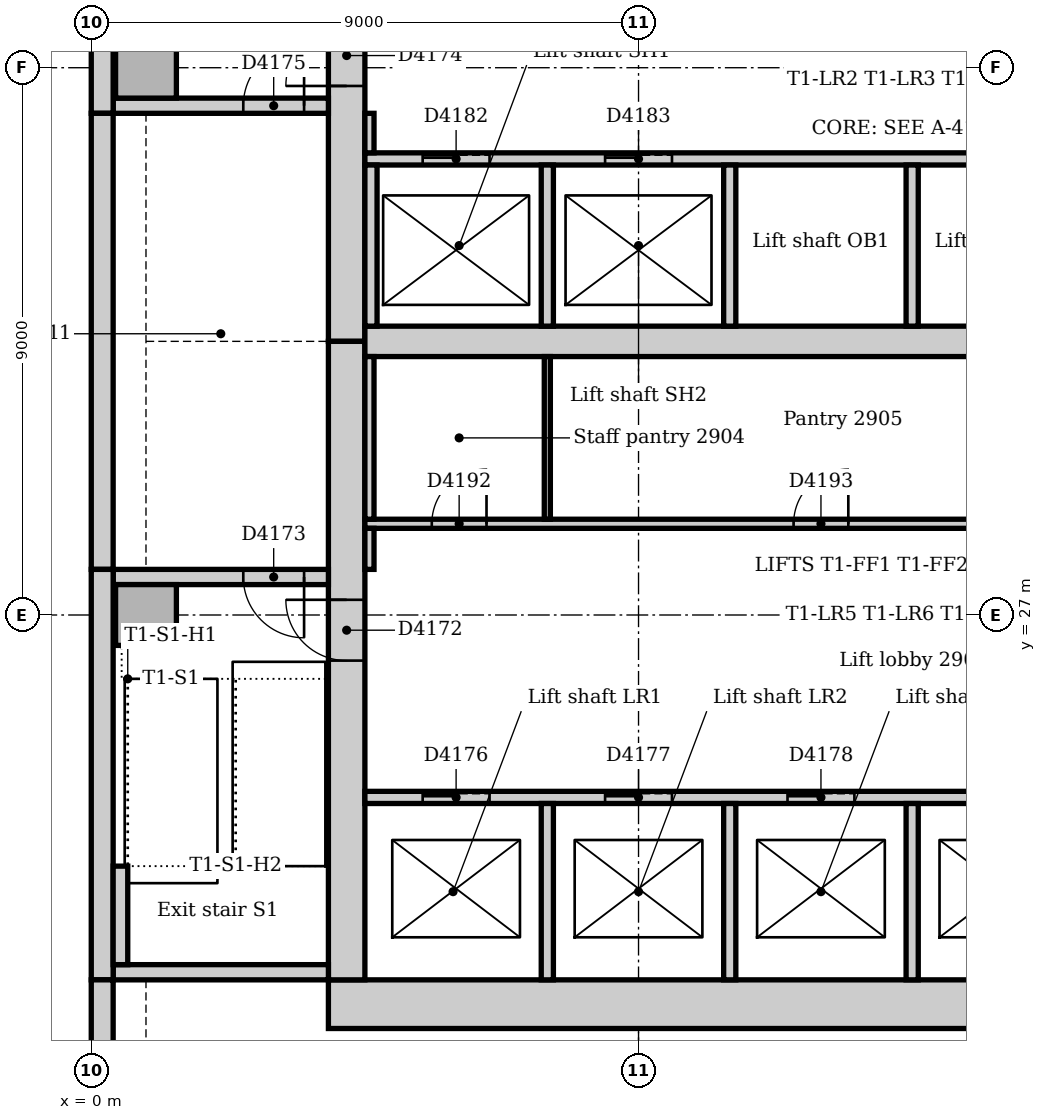
"""IFC4 building model, lengths in metres.
Left out: names, types, materials, properties, quantities, classifications, styles, units other than length and angle.
Written with IfcOpenShell. Run it as: python <this file> out.ifc"""

import sys

from ifc_helpers import new_model, si_unit, direction, frame, frame_2d, origin, origin_2d, place, context, subcontext, project, spatial, rectangle, extrude, element, fill, save


model = new_model("IFC4")
c1 = context("Model", 3, precision=1e-05, world=origin(), true_north=direction((0.0, 1.0)))
c2 = subcontext(c1, "Body", "Model", "MODEL_VIEW")
j1 = project(units=[si_unit("LENGTHUNIT", "METRE"), si_unit("PLANEANGLEUNIT", "RADIAN")], contexts=[c1])
p1 = place(None, origin())
s1 = spatial("IfcSite", under=j1, at=p1, CompositionType="ELEMENT")
p2 = place(p1, origin())
s2 = spatial("IfcBuilding", under=s1, at=p2, CompositionType="ELEMENT")
p3 = place(p2, frame((0.0, 0.0, 124.0)))
s3 = spatial("IfcBuildingStorey", under=s2, at=p3, CompositionType="ELEMENT", Elevation=124.0)
p4 = place(p3, frame((3.9, 20.6, 0.0), z_axis=(0.0, 0.0, 1.0), x_axis=(1.0, 0.0, 0.0)))
e1 = element("IfcWall", 1, at=p4, inside=s3, PredefinedType="SOLIDWALL", context=c2, shape_type="SweptSolid", body=[
    extrude(rectangle(XDim=19.4, YDim=0.8, at=frame_2d((9.7, 0.0))), origin(), (0.0, 0.0, 1.0), 4.0),
])
p5 = place(p3, frame((4.2, 42.0, 0.0), z_axis=(0.0, 0.0, 1.0), x_axis=(0.0, -1.0, 0.0)))
e2 = element("IfcWall", 2, at=p5, inside=s3, PredefinedType="SOLIDWALL", context=c2, shape_type="SweptSolid", body=[
    extrude(rectangle(XDim=10.5, YDim=0.6, at=frame_2d((5.25, 0.0))), origin(), (0.0, 0.0, 1.0), 4.0),
])
p6 = place(p5, frame((5.3, 0.0, 0.0)))
e3 = element("IfcOpeningElement", 3, at=p6, cuts=e2, PredefinedType="OPENING", context=c2, shape_type="SweptSolid", body=[
    extrude(rectangle(XDim=1.0, YDim=2.1, at=frame_2d((0.5, 1.05))), frame((0.0, 0.31, 0.0), z_axis=(0.0, -1.0, 0.0), x_axis=(1.0, 0.0, 0.0)), (0.0, 0.0, 1.0), 0.62),
])
p7 = place(p3, frame((4.2, 31.5, 0.0), z_axis=(0.0, 0.0, 1.0), x_axis=(0.0, -1.0, 0.0)))
e4 = element("IfcWall", 4, at=p7, inside=s3, PredefinedType="SOLIDWALL", context=c2, shape_type="SweptSolid", body=[
    extrude(rectangle(XDim=10.5, YDim=0.6, at=frame_2d((5.25, 0.0))), origin(), (0.0, 0.0, 1.0), 4.0),
])
p8 = place(p7, frame((4.25, 0.0, 0.0)))
e5 = element("IfcOpeningElement", 5, at=p8, cuts=e4, PredefinedType="OPENING", context=c2, shape_type="SweptSolid", body=[
    extrude(rectangle(XDim=1.0, YDim=2.1, at=frame_2d((0.5, 1.05))), frame((0.0, 0.31, 0.0), z_axis=(0.0, -1.0, 0.0), x_axis=(1.0, 0.0, 0.0)), (0.0, 0.0, 1.0), 0.62),
])
p9 = place(p3, frame((4.5, 31.5, 0.0), z_axis=(0.0, 0.0, 1.0), x_axis=(1.0, 0.0, 0.0)))
e6 = element("IfcWall", 6, at=p9, inside=s3, PredefinedType="SOLIDWALL", context=c2, shape_type="SweptSolid", body=[
    extrude(rectangle(XDim=18.0, YDim=0.5, at=frame_2d((9.0, 0.0))), origin(), (0.0, 0.0, 1.0), 4.0),
])
p10 = place(p3, frame((0.36, 21.125, 0.0), z_axis=(0.0, 0.0, 1.0), x_axis=(1.0, 0.0, 0.0)))
e7 = element("IfcWall", 7, at=p10, inside=s3, PredefinedType="SOLIDWALL", context=c2, shape_type="SweptSolid", body=[
    extrude(rectangle(XDim=3.54, YDim=0.25, at=frame_2d((1.77, 0.0))), origin(), (0.0, 0.0, 1.0), 4.0),
])
p11 = place(p3, frame((3.9, 27.625, 0.0), z_axis=(0.0, 0.0, 1.0), x_axis=(-1.0, 0.0, 0.0)))
e8 = element("IfcWall", 8, at=p11, inside=s3, PredefinedType="SOLIDWALL", context=c2, shape_type="SweptSolid", body=[
    extrude(rectangle(XDim=3.54, YDim=0.25, at=frame_2d((1.77, 0.0))), origin(), (0.0, 0.0, 1.0), 4.0),
])
p12 = place(p11, frame((0.4, 0.0, 0.0)))
e9 = element("IfcOpeningElement", 9, at=p12, cuts=e8, PredefinedType="OPENING", context=c2, shape_type="SweptSolid", body=[
    extrude(rectangle(XDim=1.0, YDim=2.1, at=frame_2d((0.5, 1.05))), frame((0.0, 0.135, 0.0), z_axis=(0.0, -1.0, 0.0), x_axis=(1.0, 0.0, 0.0)), (0.0, 0.0, 1.0), 0.27),
])
p13 = place(p3, frame((0.36, 35.375, 0.0), z_axis=(0.0, 0.0, 1.0), x_axis=(1.0, 0.0, 0.0)))
e10 = element("IfcWall", 10, at=p13, inside=s3, PredefinedType="SOLIDWALL", context=c2, shape_type="SweptSolid", body=[
    extrude(rectangle(XDim=3.54, YDim=0.25, at=frame_2d((1.77, 0.0))), origin(), (0.0, 0.0, 1.0), 4.0),
])
p14 = place(p13, frame((2.14, 0.0, 0.0)))
e11 = element("IfcOpeningElement", 11, at=p14, cuts=e10, PredefinedType="OPENING", context=c2, shape_type="SweptSolid", body=[
    extrude(rectangle(XDim=1.0, YDim=2.1, at=frame_2d((0.5, 1.05))), frame((0.0, 0.135, 0.0), z_axis=(0.0, -1.0, 0.0), x_axis=(1.0, 0.0, 0.0)), (0.0, 0.0, 1.0), 0.27),
])
for number, where, z_axis, x_axis in (
    (12, (0.9, 27.0, 0.0), (0.0, 0.0, 1.0), (1.0, 0.0, 0.0)),
    (13, (0.9, 36.0, 0.0), (0.0, 0.0, 1.0), (1.0, 0.0, 0.0)),
):
    element("IfcColumn", number, at=place(p3, frame(where, z_axis=z_axis, x_axis=x_axis)), inside=s3, PredefinedType="COLUMN", context=c2, shape_type="SweptSolid", body=[
        extrude(rectangle(XDim=1.0, YDim=1.0, at=origin_2d()), origin(), (0.0, 0.0, 1.0), 4.0),
    ])
p15 = place(p3, frame((0.18, 42.0, 0.0), z_axis=(0.0, 0.0, 1.0), x_axis=(0.0, -1.0, 0.0)))
e14 = element("IfcWall", 14, at=p15, inside=s3, PredefinedType="STANDARD", context=c2, shape_type="SweptSolid", body=[
    extrude(rectangle(XDim=6.75, YDim=0.36, at=frame_2d((3.375, 0.0))), origin(), (0.0, 0.0, 1.0), 3.85),
])
p16 = place(p3, frame((0.18, 35.25, 0.0), z_axis=(0.0, 0.0, 1.0), x_axis=(0.0, -1.0, 0.0)))
e15 = element("IfcWall", 15, at=p16, inside=s3, PredefinedType="STANDARD", context=c2, shape_type="SweptSolid", body=[
    extrude(rectangle(XDim=7.5, YDim=0.36, at=frame_2d((3.75, 0.0))), origin(), (0.0, 0.0, 1.0), 3.85),
])
p17 = place(p3, frame((0.18, 27.75, 0.0), z_axis=(0.0, 0.0, 1.0), x_axis=(0.0, -1.0, 0.0)))
e16 = element("IfcWall", 16, at=p17, inside=s3, PredefinedType="STANDARD", context=c2, shape_type="SweptSolid", body=[
    extrude(rectangle(XDim=6.75, YDim=0.36, at=frame_2d((3.375, 0.0))), origin(), (0.0, 0.0, 1.0), 3.85),
])
p18 = place(p3, frame((0.18, 21.0, 0.0), z_axis=(0.0, 0.0, 1.0), x_axis=(0.0, -1.0, 0.0)))
e17 = element("IfcWall", 17, at=p18, inside=s3, PredefinedType="STANDARD", context=c2, shape_type="SweptSolid", body=[
    extrude(rectangle(XDim=12.257, YDim=0.36, at=frame_2d((6.129, 0.0))), origin(), (0.0, 0.0, 1.0), 3.85),
])
p19 = place(p18, frame((1.35, 0.0, 0.9)))
e18 = element("IfcOpeningElement", 18, at=p19, cuts=e17, PredefinedType="OPENING", context=c2, shape_type="SweptSolid", body=[
    extrude(rectangle(XDim=3.3, YDim=1.6, at=frame_2d((1.65, 0.8))), frame((0.0, 0.19, 0.0), z_axis=(0.0, -1.0, 0.0), x_axis=(1.0, 0.0, 0.0)), (0.0, 0.0, 1.0), 0.38),
])
p20 = place(p18, frame((5.85, 0.0, 0.9)))
e19 = element("IfcOpeningElement", 19, at=p20, cuts=e17, PredefinedType="OPENING", context=c2, shape_type="SweptSolid", body=[
    extrude(rectangle(XDim=3.3, YDim=1.6, at=frame_2d((1.65, 0.8))), frame((0.0, 0.19, 0.0), z_axis=(0.0, -1.0, 0.0), x_axis=(1.0, 0.0, 0.0)), (0.0, 0.0, 1.0), 0.38),
])
p21 = place(p3, frame((0.48, 21.25, 0.0), z_axis=(0.0, 0.0, 1.0), x_axis=(0.0, 1.0, 0.0)))
e20 = element("IfcWall", 20, at=p21, inside=s3, PredefinedType="STANDARD", context=c2, shape_type="SweptSolid", body=[
    extrude(rectangle(XDim=1.62, YDim=0.24, at=frame_2d((0.81, 0.0))), origin(), (0.0, 0.0, 1.0), 4.0),
])
p22 = place(p3, frame((4.5, 24.0, 0.0), z_axis=(0.0, 0.0, 1.0), x_axis=(1.0, 0.0, 0.0)))
e21 = element("IfcWall", 21, at=p22, inside=s3, PredefinedType="PARTITIONING", context=c2, shape_type="SweptSolid", body=[
    extrude(rectangle(XDim=18.0, YDim=0.2, at=frame_2d((9.0, 0.0))), origin(), (0.0, 0.0, 1.0), 3.85),
])
p23 = place(p22, frame((0.95, 0.0, 0.0)))
e22 = element("IfcOpeningElement", 22, at=p23, cuts=e21, PredefinedType="OPENING", context=c2, shape_type="SweptSolid", body=[
    extrude(rectangle(XDim=1.1, YDim=2.1, at=frame_2d((0.55, 1.05))), frame((0.0, 0.11, 0.0), z_axis=(0.0, -1.0, 0.0), x_axis=(1.0, 0.0, 0.0)), (0.0, 0.0, 1.0), 0.22),
])
p24 = place(p22, frame((3.95, 0.0, 0.0)))
e23 = element("IfcOpeningElement", 23, at=p24, cuts=e21, PredefinedType="OPENING", context=c2, shape_type="SweptSolid", body=[
    extrude(rectangle(XDim=1.1, YDim=2.1, at=frame_2d((0.55, 1.05))), frame((0.0, 0.11, 0.0), z_axis=(0.0, -1.0, 0.0), x_axis=(1.0, 0.0, 0.0)), (0.0, 0.0, 1.0), 0.22),
])
p25 = place(p22, frame((6.95, 0.0, 0.0)))
e24 = element("IfcOpeningElement", 24, at=p25, cuts=e21, PredefinedType="OPENING", context=c2, shape_type="SweptSolid", body=[
    extrude(rectangle(XDim=1.1, YDim=2.1, at=frame_2d((0.55, 1.05))), frame((0.0, 0.11, 0.0), z_axis=(0.0, -1.0, 0.0), x_axis=(1.0, 0.0, 0.0)), (0.0, 0.0, 1.0), 0.22),
])
p26 = place(p22, frame((9.95, 0.0, 0.0)))
e25 = element("IfcOpeningElement", 25, at=p26, cuts=e21, PredefinedType="OPENING", context=c2, shape_type="SweptSolid", body=[
    extrude(rectangle(XDim=1.1, YDim=2.1, at=frame_2d((0.55, 1.05))), frame((0.0, 0.11, 0.0), z_axis=(0.0, -1.0, 0.0), x_axis=(1.0, 0.0, 0.0)), (0.0, 0.0, 1.0), 0.22),
])
p27 = place(p22, frame((12.95, 0.0, 0.0)))
e26 = element("IfcOpeningElement", 26, at=p27, cuts=e21, PredefinedType="OPENING", context=c2, shape_type="SweptSolid", body=[
    extrude(rectangle(XDim=1.1, YDim=2.1, at=frame_2d((0.55, 1.05))), frame((0.0, 0.11, 0.0), z_axis=(0.0, -1.0, 0.0), x_axis=(1.0, 0.0, 0.0)), (0.0, 0.0, 1.0), 0.22),
])
p28 = place(p22, frame((15.95, 0.0, 0.0)))
e27 = element("IfcOpeningElement", 27, at=p28, cuts=e21, PredefinedType="OPENING", context=c2, shape_type="SweptSolid", body=[
    extrude(rectangle(XDim=1.1, YDim=2.1, at=frame_2d((0.55, 1.05))), frame((0.0, 0.11, 0.0), z_axis=(0.0, -1.0, 0.0), x_axis=(1.0, 0.0, 0.0)), (0.0, 0.0, 1.0), 0.22),
])
p29 = place(p3, frame((4.5, 34.5, 0.0), z_axis=(0.0, 0.0, 1.0), x_axis=(1.0, 0.0, 0.0)))
e28 = element("IfcWall", 28, at=p29, inside=s3, PredefinedType="PARTITIONING", context=c2, shape_type="SweptSolid", body=[
    extrude(rectangle(XDim=18.0, YDim=0.2, at=frame_2d((9.0, 0.0))), origin(), (0.0, 0.0, 1.0), 3.85),
])
p30 = place(p29, frame((0.95, 0.0, 0.0)))
e29 = element("IfcOpeningElement", 29, at=p30, cuts=e28, PredefinedType="OPENING", context=c2, shape_type="SweptSolid", body=[
    extrude(rectangle(XDim=1.1, YDim=2.1, at=frame_2d((0.55, 1.05))), frame((0.0, 0.11, 0.0), z_axis=(0.0, -1.0, 0.0), x_axis=(1.0, 0.0, 0.0)), (0.0, 0.0, 1.0), 0.22),
])
p31 = place(p29, frame((3.95, 0.0, 0.0)))
e30 = element("IfcOpeningElement", 30, at=p31, cuts=e28, PredefinedType="OPENING", context=c2, shape_type="SweptSolid", body=[
    extrude(rectangle(XDim=1.1, YDim=2.1, at=frame_2d((0.55, 1.05))), frame((0.0, 0.11, 0.0), z_axis=(0.0, -1.0, 0.0), x_axis=(1.0, 0.0, 0.0)), (0.0, 0.0, 1.0), 0.22),
])
p32 = place(p29, frame((12.95, 0.0, 0.0)))
e31 = element("IfcOpeningElement", 31, at=p32, cuts=e28, PredefinedType="OPENING", context=c2, shape_type="SweptSolid", body=[
    extrude(rectangle(XDim=1.1, YDim=2.1, at=frame_2d((0.55, 1.05))), frame((0.0, 0.11, 0.0), z_axis=(0.0, -1.0, 0.0), x_axis=(1.0, 0.0, 0.0)), (0.0, 0.0, 1.0), 0.22),
])
p33 = place(p29, frame((15.95, 0.0, 0.0)))
e32 = element("IfcOpeningElement", 32, at=p33, cuts=e28, PredefinedType="OPENING", context=c2, shape_type="SweptSolid", body=[
    extrude(rectangle(XDim=1.1, YDim=2.1, at=frame_2d((0.55, 1.05))), frame((0.0, 0.11, 0.0), z_axis=(0.0, -1.0, 0.0), x_axis=(1.0, 0.0, 0.0)), (0.0, 0.0, 1.0), 0.22),
])
p34 = place(p3, frame((4.6, 31.75, 0.0), z_axis=(0.0, 0.0, 1.0), x_axis=(0.0, 1.0, 0.0)))
e33 = element("IfcWall", 33, at=p34, inside=s3, PredefinedType="PARTITIONING", context=c2, shape_type="SweptSolid", body=[
    extrude(rectangle(XDim=2.65, YDim=0.2, at=frame_2d((1.325, 0.0))), origin(), (0.0, 0.0, 1.0), 3.85),
])
p35 = place(p3, frame((7.5, 21.0, 0.0), z_axis=(0.0, 0.0, 1.0), x_axis=(0.0, 1.0, 0.0)))
e34 = element("IfcWall", 34, at=p35, inside=s3, PredefinedType="PARTITIONING", context=c2, shape_type="SweptSolid", body=[
    extrude(rectangle(XDim=2.9, YDim=0.2, at=frame_2d((1.45, 0.0))), origin(), (0.0, 0.0, 1.0), 3.85),
])
p36 = place(p3, frame((7.5, 31.75, 0.0), z_axis=(0.0, 0.0, 1.0), x_axis=(0.0, 1.0, 0.0)))
e35 = element("IfcWall", 35, at=p36, inside=s3, PredefinedType="PARTITIONING", context=c2, shape_type="SweptSolid", body=[
    extrude(rectangle(XDim=2.65, YDim=0.2, at=frame_2d((1.325, 0.0))), origin(), (0.0, 0.0, 1.0), 3.85),
])
p37 = place(p3, frame((10.5, 21.0, 0.0), z_axis=(0.0, 0.0, 1.0), x_axis=(0.0, 1.0, 0.0)))
e36 = element("IfcWall", 36, at=p37, inside=s3, PredefinedType="PARTITIONING", context=c2, shape_type="SweptSolid", body=[
    extrude(rectangle(XDim=2.9, YDim=0.2, at=frame_2d((1.45, 0.0))), origin(), (0.0, 0.0, 1.0), 3.85),
])
p38 = place(p3, frame((10.5, 31.75, 0.0), z_axis=(0.0, 0.0, 1.0), x_axis=(0.0, 1.0, 0.0)))
e37 = element("IfcWall", 37, at=p38, inside=s3, PredefinedType="PARTITIONING", context=c2, shape_type="SweptSolid", body=[
    extrude(rectangle(XDim=2.65, YDim=0.2, at=frame_2d((1.325, 0.0))), origin(), (0.0, 0.0, 1.0), 3.85),
])
p39 = place(p3, frame((13.5, 21.0, 0.0), z_axis=(0.0, 0.0, 1.0), x_axis=(0.0, 1.0, 0.0)))
e38 = element("IfcWall", 38, at=p39, inside=s3, PredefinedType="PARTITIONING", context=c2, shape_type="SweptSolid", body=[
    extrude(rectangle(XDim=2.9, YDim=0.2, at=frame_2d((1.45, 0.0))), origin(), (0.0, 0.0, 1.0), 3.85),
])
p40 = place(p3, frame((13.5, 31.75, 0.0), z_axis=(0.0, 0.0, 1.0), x_axis=(0.0, 1.0, 0.0)))
e39 = element("IfcWall", 39, at=p40, inside=s3, PredefinedType="PARTITIONING", context=c2, shape_type="SweptSolid", body=[
    extrude(rectangle(XDim=2.65, YDim=0.2, at=frame_2d((1.325, 0.0))), origin(), (0.0, 0.0, 1.0), 3.85),
])
p41 = place(p3, frame((4.5, 28.5, 0.0), z_axis=(0.0, 0.0, 1.0), x_axis=(1.0, 0.0, 0.0)))
e40 = element("IfcWall", 40, at=p41, inside=s3, PredefinedType="PARTITIONING", context=c2, shape_type="SweptSolid", body=[
    extrude(rectangle(XDim=18.0, YDim=0.15, at=frame_2d((9.0, 0.0))), origin(), (0.0, 0.0, 1.0), 3.85),
])
p42 = place(p41, frame((1.1, 0.0, 0.0)))
e41 = element("IfcOpeningElement", 41, at=p42, cuts=e40, PredefinedType="OPENING", context=c2, shape_type="SweptSolid", body=[
    extrude(rectangle(XDim=0.9, YDim=2.1, at=frame_2d((0.45, 1.05))), frame((0.0, 0.085, 0.0), z_axis=(0.0, -1.0, 0.0), x_axis=(1.0, 0.0, 0.0)), (0.0, 0.0, 1.0), 0.17),
])
p43 = place(p41, frame((7.05, 0.0, 0.0)))
e42 = element("IfcOpeningElement", 42, at=p43, cuts=e40, PredefinedType="OPENING", context=c2, shape_type="SweptSolid", body=[
    extrude(rectangle(XDim=0.9, YDim=2.1, at=frame_2d((0.45, 1.05))), frame((0.0, 0.085, 0.0), z_axis=(0.0, -1.0, 0.0), x_axis=(1.0, 0.0, 0.0)), (0.0, 0.0, 1.0), 0.17),
])
p44 = place(p41, frame((14.45, 0.0, 0.0)))
e43 = element("IfcOpeningElement", 43, at=p44, cuts=e40, PredefinedType="OPENING", context=c2, shape_type="SweptSolid", body=[
    extrude(rectangle(XDim=0.9, YDim=2.1, at=frame_2d((0.45, 1.05))), frame((0.0, 0.085, 0.0), z_axis=(0.0, -1.0, 0.0), x_axis=(1.0, 0.0, 0.0)), (0.0, 0.0, 1.0), 0.17),
])
p45 = place(p3, frame((4.575, 27.75, 0.0), z_axis=(0.0, 0.0, 1.0), x_axis=(0.0, 1.0, 0.0)))
e44 = element("IfcWall", 44, at=p45, inside=s3, PredefinedType="PARTITIONING", context=c2, shape_type="SweptSolid", body=[
    extrude(rectangle(XDim=0.675, YDim=0.15, at=frame_2d((0.338, 0.0))), origin(), (0.0, 0.0, 1.0), 3.85),
])
p46 = place(p3, frame((4.575, 28.575, 0.0), z_axis=(0.0, 0.0, 1.0), x_axis=(0.0, 1.0, 0.0)))
e45 = element("IfcWall", 45, at=p46, inside=s3, PredefinedType="PARTITIONING", context=c2, shape_type="SweptSolid", body=[
    extrude(rectangle(XDim=2.675, YDim=0.15, at=frame_2d((1.337, 0.0))), origin(), (0.0, 0.0, 1.0), 3.85),
])
p47 = place(p3, frame((4.575, 34.6, 0.0), z_axis=(0.0, 0.0, 1.0), x_axis=(0.0, 1.0, 0.0)))
e46 = element("IfcWall", 46, at=p47, inside=s3, PredefinedType="PARTITIONING", context=c2, shape_type="SweptSolid", body=[
    extrude(rectangle(XDim=0.65, YDim=0.15, at=frame_2d((0.325, 0.0))), origin(), (0.0, 0.0, 1.0), 3.85),
])
p48 = place(p3, frame((7.5, 28.575, 0.0), z_axis=(0.0, 0.0, 1.0), x_axis=(0.0, 1.0, 0.0)))
e47 = element("IfcWall", 47, at=p48, inside=s3, PredefinedType="PARTITIONING", context=c2, shape_type="SweptSolid", body=[
    extrude(rectangle(XDim=2.675, YDim=0.1, at=frame_2d((1.337, 0.0))), origin(), (0.0, 0.0, 1.0), 3.85),
])
p49 = place(p8, frame((1.0, 0.0, 0.0), z_axis=(0.0, 0.0, 1.0), x_axis=(-1.0, 0.0, 0.0)))
e48 = element("IfcDoor", 48, at=p49, inside=s3, OperationType="SINGLE_SWING_RIGHT", PredefinedType="DOOR", context=c2, shape_type="SweptSolid", body=[
    extrude(rectangle(XDim=1.0, YDim=2.1, at=frame_2d((0.5, 1.05))), frame((0.0, 0.025, 0.0), z_axis=(0.0, -1.0, 0.0), x_axis=(1.0, 0.0, 0.0)), (0.0, 0.0, 1.0), 0.05),
])
fill(e5, e48)
p50 = place(p12, origin())
e49 = element("IfcDoor", 49, at=p50, inside=s3, OperationType="SINGLE_SWING_LEFT", PredefinedType="DOOR", context=c2, shape_type="SweptSolid", body=[
    extrude(rectangle(XDim=1.0, YDim=2.1, at=frame_2d((0.5, 1.05))), frame((0.0, 0.025, 0.0), z_axis=(0.0, -1.0, 0.0), x_axis=(1.0, 0.0, 0.0)), (0.0, 0.0, 1.0), 0.05),
])
fill(e9, e49)
p51 = place(p6, frame((1.0, 0.0, 0.0), z_axis=(0.0, 0.0, 1.0), x_axis=(-1.0, 0.0, 0.0)))
e50 = element("IfcDoor", 50, at=p51, inside=s3, OperationType="SINGLE_SWING_LEFT", PredefinedType="DOOR", context=c2, shape_type="SweptSolid", body=[
    extrude(rectangle(XDim=1.0, YDim=2.1, at=frame_2d((0.5, 1.05))), frame((0.0, 0.025, 0.0), z_axis=(0.0, -1.0, 0.0), x_axis=(1.0, 0.0, 0.0)), (0.0, 0.0, 1.0), 0.05),
])
fill(e3, e50)
p52 = place(p14, origin())
e51 = element("IfcDoor", 51, at=p52, inside=s3, OperationType="SINGLE_SWING_RIGHT", PredefinedType="DOOR", context=c2, shape_type="SweptSolid", body=[
    extrude(rectangle(XDim=1.0, YDim=2.1, at=frame_2d((0.5, 1.05))), frame((0.0, 0.025, 0.0), z_axis=(0.0, -1.0, 0.0), x_axis=(1.0, 0.0, 0.0)), (0.0, 0.0, 1.0), 0.05),
])
fill(e11, e51)
p53 = place(p23, origin())
e52 = element("IfcDoor", 52, at=p53, inside=s3, OperationType="SLIDING_TO_LEFT", PredefinedType="DOOR", context=c2, shape_type="SweptSolid", body=[
    extrude(rectangle(XDim=1.1, YDim=2.1, at=frame_2d((0.55, 1.05))), frame((0.0, 0.025, 0.0), z_axis=(0.0, -1.0, 0.0), x_axis=(1.0, 0.0, 0.0)), (0.0, 0.0, 1.0), 0.05),
])
fill(e22, e52)
p54 = place(p24, origin())
e53 = element("IfcDoor", 53, at=p54, inside=s3, OperationType="SLIDING_TO_LEFT", PredefinedType="DOOR", context=c2, shape_type="SweptSolid", body=[
    extrude(rectangle(XDim=1.1, YDim=2.1, at=frame_2d((0.55, 1.05))), frame((0.0, 0.025, 0.0), z_axis=(0.0, -1.0, 0.0), x_axis=(1.0, 0.0, 0.0)), (0.0, 0.0, 1.0), 0.05),
])
fill(e23, e53)
p55 = place(p25, origin())
e54 = element("IfcDoor", 54, at=p55, inside=s3, OperationType="SLIDING_TO_LEFT", PredefinedType="DOOR", context=c2, shape_type="SweptSolid", body=[
    extrude(rectangle(XDim=1.1, YDim=2.1, at=frame_2d((0.55, 1.05))), frame((0.0, 0.025, 0.0), z_axis=(0.0, -1.0, 0.0), x_axis=(1.0, 0.0, 0.0)), (0.0, 0.0, 1.0), 0.05),
])
fill(e24, e54)
p56 = place(p30, origin())
e55 = element("IfcDoor", 55, at=p56, inside=s3, OperationType="SLIDING_TO_LEFT", PredefinedType="DOOR", context=c2, shape_type="SweptSolid", body=[
    extrude(rectangle(XDim=1.1, YDim=2.1, at=frame_2d((0.55, 1.05))), frame((0.0, 0.025, 0.0), z_axis=(0.0, -1.0, 0.0), x_axis=(1.0, 0.0, 0.0)), (0.0, 0.0, 1.0), 0.05),
])
fill(e29, e55)
p57 = place(p31, origin())
e56 = element("IfcDoor", 56, at=p57, inside=s3, OperationType="SLIDING_TO_LEFT", PredefinedType="DOOR", context=c2, shape_type="SweptSolid", body=[
    extrude(rectangle(XDim=1.1, YDim=2.1, at=frame_2d((0.55, 1.05))), frame((0.0, 0.025, 0.0), z_axis=(0.0, -1.0, 0.0), x_axis=(1.0, 0.0, 0.0)), (0.0, 0.0, 1.0), 0.05),
])
fill(e30, e56)
p58 = place(p42, origin())
e57 = element("IfcDoor", 57, at=p58, inside=s3, OperationType="SINGLE_SWING_RIGHT", PredefinedType="DOOR", context=c2, shape_type="SweptSolid", body=[
    extrude(rectangle(XDim=0.9, YDim=2.1, at=frame_2d((0.45, 1.05))), frame((0.0, 0.025, 0.0), z_axis=(0.0, -1.0, 0.0), x_axis=(1.0, 0.0, 0.0)), (0.0, 0.0, 1.0), 0.05),
])
fill(e41, e57)
p59 = place(p43, origin())
e58 = element("IfcDoor", 58, at=p59, inside=s3, OperationType="SINGLE_SWING_RIGHT", PredefinedType="DOOR", context=c2, shape_type="SweptSolid", body=[
    extrude(rectangle(XDim=0.9, YDim=2.1, at=frame_2d((0.45, 1.05))), frame((0.0, 0.025, 0.0), z_axis=(0.0, -1.0, 0.0), x_axis=(1.0, 0.0, 0.0)), (0.0, 0.0, 1.0), 0.05),
])
fill(e42, e58)
save(model, sys.argv[1])
